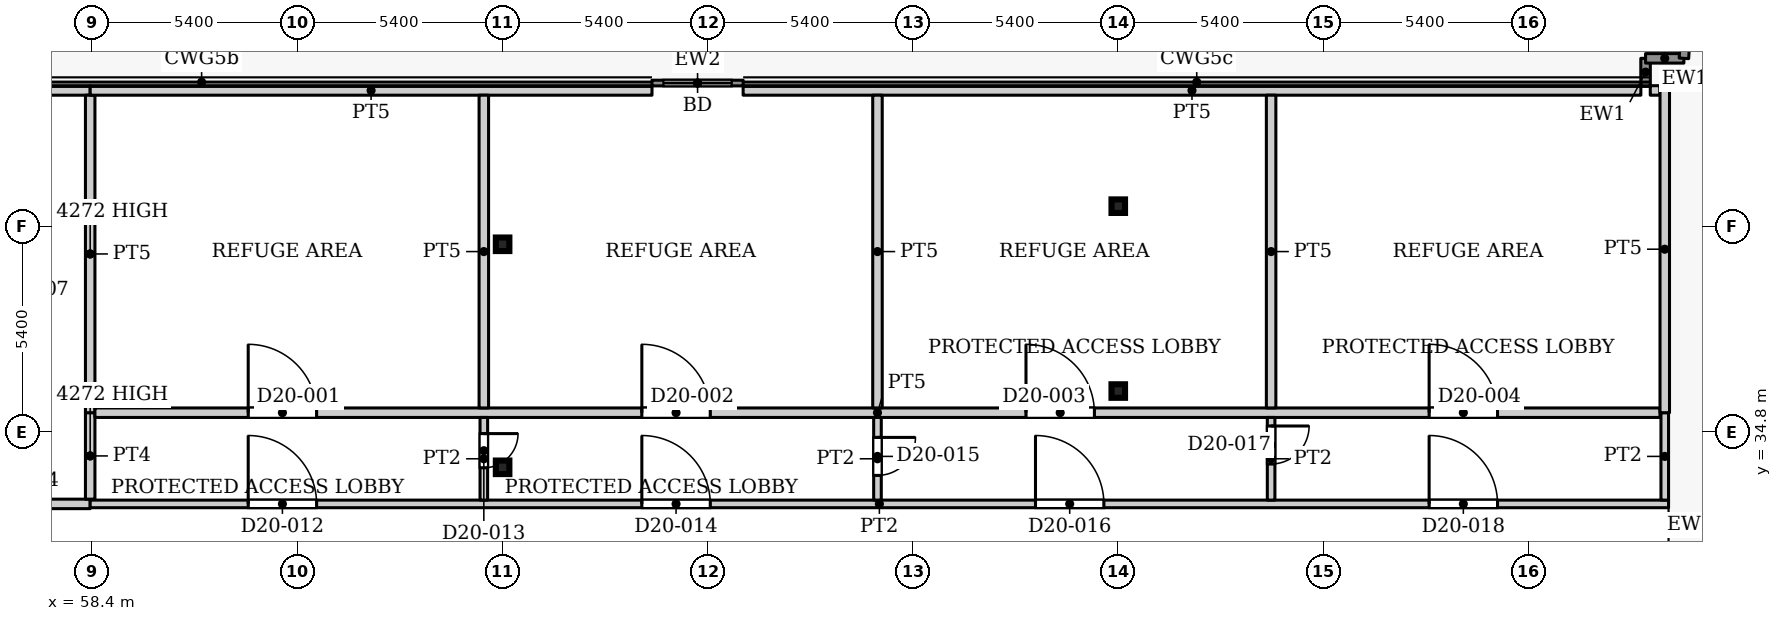
"""IFC4 building model, lengths in metres.
Left out: names, types, materials, properties, quantities, classifications, styles, units other than length and angle.
Written with IfcOpenShell. Run it as: python <this file> out.ifc"""

import sys

from ifc_helpers import new_model, si_unit, direction, frame, frame_2d, origin, origin_2d, place, context, subcontext, project, spatial, rectangle, hollow_rectangle, extrude, source, transform, mapped, element, fill, save


model = new_model("IFC4")
c1 = context("Model", 3, precision=1e-05, world=origin(), true_north=direction((0.0, 1.0)))
c2 = subcontext(c1, "Body", "Model", "MODEL_VIEW")
j1 = project(units=[si_unit("LENGTHUNIT", "METRE"), si_unit("PLANEANGLEUNIT", "RADIAN")], contexts=[c1])
p1 = place(None, origin())
s1 = spatial("IfcSite", under=j1, at=p1, CompositionType="ELEMENT")
p2 = place(p1, origin())
s2 = spatial("IfcBuilding", under=s1, at=p2, CompositionType="ELEMENT")
p3 = place(p2, frame((0.0, 0.0, 89.0)))
s3 = spatial("IfcBuildingStorey", under=s2, at=p3, CompositionType="ELEMENT", Elevation=89.0)
for number, where, z_axis, x_axis in (
    (1, (69.2, 33.863, 0.0), (0.0, 0.0, 1.0), (1.0, 0.0, 0.0)),
    (2, (85.4, 35.87, 0.0), (0.0, 0.0, 1.0), (1.0, 0.0, 0.0)),
    (3, (69.2, 39.732, 0.0), (0.0, 0.0, 1.0), (1.0, 0.0, 0.0)),
    (4, (85.4, 40.735, 0.0), (0.0, 0.0, 1.0), (1.0, 0.0, 0.0)),
):
    element("IfcColumn", number, at=place(p3, frame(where, z_axis=z_axis, x_axis=x_axis)), inside=s3, PredefinedType="COLUMN", context=c2, shape_type="SweptSolid", body=[
        extrude(hollow_rectangle(XDim=0.356, YDim=0.356, WallThickness=0.016, InnerFilletRadius=0.016, OuterFilletRadius=0.032, at=origin_2d()), origin(), (0.0, 0.0, 1.0), 5.1),
    ])
p4 = place(p3, frame((73.13, 43.975, 0.0), z_axis=(0.0, 0.0, 1.0), x_axis=(1.0, 0.0, 0.0)))
e5 = element("IfcWall", 5, at=p4, inside=s3, PredefinedType="SOLIDWALL", context=c2, shape_type="SweptSolid", body=[
    extrude(rectangle(XDim=2.4, YDim=0.15, at=frame_2d((1.2, 0.0))), origin(), (0.0, 0.0, 1.0), 4.95),
])
p5 = place(p4, frame((0.3, 0.0, 0.0)))
e6 = element("IfcOpeningElement", 6, at=p5, cuts=e5, PredefinedType="OPENING", context=c2, shape_type="SweptSolid", body=[
    extrude(rectangle(XDim=1.8, YDim=2.4, at=frame_2d((0.9, 1.2))), frame((0.0, 0.085, 0.0), z_axis=(0.0, -1.0, 0.0), x_axis=(1.0, 0.0, 0.0)), (0.0, 0.0, 1.0), 0.17),
])
p6 = place(p3, frame((99.275, 43.9, 0.0), z_axis=(0.0, 0.0, 1.0), x_axis=(0.0, 1.0, 0.0)))
e7 = element("IfcWall", 7, at=p6, inside=s3, PredefinedType="SOLIDWALL", context=c2, shape_type="SweptSolid", body=[
    extrude(rectangle(XDim=0.725, YDim=0.25, at=frame_2d((0.363, 0.0))), origin(), (0.0, 0.0, 1.0), 4.95),
])
p7 = place(p3, frame((99.275, 44.625, 0.0), z_axis=(0.0, 0.0, 1.0), x_axis=(1.0, 0.0, 0.0)))
e8 = element("IfcWall", 8, at=p7, inside=s3, PredefinedType="SOLIDWALL", context=c2, shape_type="SweptSolid", body=[
    extrude(rectangle(XDim=1.009, YDim=0.25, at=frame_2d((0.504, 0.0))), origin(), (0.0, 0.0, 1.0), 4.95),
])
p8 = place(p3, frame((100.284, 44.625, 0.0), z_axis=(0.0, 0.0, 1.0), x_axis=(0.064063773599, 0.997945806601, 0.0)))
e9 = element("IfcWall", 9, at=p8, inside=s3, PredefinedType="SOLIDWALL", context=c2, shape_type="SweptSolid", body=[
    extrude(rectangle(XDim=0.64, YDim=0.25, at=frame_2d((0.32, 0.0))), origin(), (0.0, 0.0, 1.0), 4.95),
])
p9 = place(p3, frame((49.611, 43.78, 0.0), z_axis=(0.0, 0.0, 1.0), x_axis=(1.0, 0.0, 0.0)))
e10 = element("IfcWall", 10, at=p9, inside=s3, PredefinedType="PARTITIONING", context=c2, shape_type="SweptSolid", body=[
    extrude(rectangle(XDim=8.737, YDim=0.25, at=frame_2d((4.368, 0.0))), origin(), (0.0, 0.0, 1.0), 4.8),
])
p10 = place(p3, frame((55.675, 32.9, 0.0), z_axis=(0.0, 0.0, 1.0), x_axis=(1.0, 0.0, 0.0)))
e11 = element("IfcWall", 11, at=p10, inside=s3, PredefinedType="PARTITIONING", context=c2, shape_type="SweptSolid", body=[
    extrude(rectangle(XDim=2.673, YDim=0.25, at=frame_2d((1.336, 0.0))), origin(), (0.0, 0.0, 1.0), 4.8),
])
p11 = place(p3, frame((58.348, 32.9, 0.0), z_axis=(0.0, 0.0, 1.0), x_axis=(1.0, 0.0, 0.0)))
e12 = element("IfcWall", 12, at=p11, inside=s3, PredefinedType="PARTITIONING", context=c2, shape_type="SweptSolid", body=[
    extrude(rectangle(XDim=41.532, YDim=0.2, at=frame_2d((20.766, 0.0))), origin(), (0.0, 0.0, 1.0), 4.8),
])
p12 = place(p11, frame((4.158, 0.0, 0.0)))
e13 = element("IfcOpeningElement", 13, at=p12, cuts=e12, PredefinedType="OPENING", context=c2, shape_type="SweptSolid", body=[
    extrude(rectangle(XDim=1.8, YDim=2.1, at=frame_2d((0.9, 1.05))), frame((0.0, 0.11, 0.0), z_axis=(0.0, -1.0, 0.0), x_axis=(1.0, 0.0, 0.0)), (0.0, 0.0, 1.0), 0.22),
])
p13 = place(p11, frame((14.516, 0.0, 0.0)))
e14 = element("IfcOpeningElement", 14, at=p13, cuts=e12, PredefinedType="OPENING", context=c2, shape_type="SweptSolid", body=[
    extrude(rectangle(XDim=1.8, YDim=2.1, at=frame_2d((0.9, 1.05))), frame((0.0, 0.11, 0.0), z_axis=(0.0, -1.0, 0.0), x_axis=(1.0, 0.0, 0.0)), (0.0, 0.0, 1.0), 0.22),
])
p14 = place(p11, frame((24.874, 0.0, 0.0)))
e15 = element("IfcOpeningElement", 15, at=p14, cuts=e12, PredefinedType="OPENING", context=c2, shape_type="SweptSolid", body=[
    extrude(rectangle(XDim=1.8, YDim=2.1, at=frame_2d((0.9, 1.05))), frame((0.0, 0.11, 0.0), z_axis=(0.0, -1.0, 0.0), x_axis=(1.0, 0.0, 0.0)), (0.0, 0.0, 1.0), 0.22),
])
p15 = place(p11, frame((35.232, 0.0, 0.0)))
e16 = element("IfcOpeningElement", 16, at=p15, cuts=e12, PredefinedType="OPENING", context=c2, shape_type="SweptSolid", body=[
    extrude(rectangle(XDim=1.8, YDim=2.1, at=frame_2d((0.9, 1.05))), frame((0.0, 0.11, 0.0), z_axis=(0.0, -1.0, 0.0), x_axis=(1.0, 0.0, 0.0)), (0.0, 0.0, 1.0), 0.22),
])
p16 = place(p3, frame((58.348, 33.025, 0.0), z_axis=(0.0, 0.0, 1.0), x_axis=(0.0, 1.0, 0.0)))
e17 = element("IfcWall", 17, at=p16, inside=s3, PredefinedType="PARTITIONING", context=c2, shape_type="SweptSolid", body=[
    extrude(rectangle(XDim=2.275, YDim=0.25, at=frame_2d((1.138, 0.0))), origin(), (0.0, 0.0, 1.0), 4.272),
])
p17 = place(p3, frame((58.348, 35.3, 0.0), z_axis=(0.0, 0.0, 1.0), x_axis=(0.0, 1.0, 0.0)))
e18 = element("IfcWall", 18, at=p17, inside=s3, PredefinedType="PARTITIONING", context=c2, shape_type="SweptSolid", body=[
    extrude(rectangle(XDim=8.355, YDim=0.25, at=frame_2d((4.177, 0.0))), origin(), (0.0, 0.0, 1.0), 4.272),
])
p18 = place(p3, frame((58.348, 43.78, 0.0), z_axis=(0.0, 0.0, 1.0), x_axis=(1.0, 0.0, 0.0)))
e19 = element("IfcWall", 19, at=p18, inside=s3, PredefinedType="PARTITIONING", context=c2, shape_type="SweptSolid", body=[
    extrude(rectangle(XDim=14.783, YDim=0.25, at=frame_2d((7.392, 0.0))), origin(), (0.0, 0.0, 1.0), 4.8),
])
p19 = place(p3, frame((58.473, 35.3, 0.0), z_axis=(0.0, 0.0, 1.0), x_axis=(1.0, 0.0, 0.0)))
e20 = element("IfcWall", 20, at=p19, inside=s3, PredefinedType="PARTITIONING", context=c2, shape_type="SweptSolid", body=[
    extrude(rectangle(XDim=41.182, YDim=0.25, at=frame_2d((20.591, 0.0))), origin(), (0.0, 0.0, 1.0), 4.8),
])
p20 = place(p19, frame((4.033, 0.0, 0.0)))
e21 = element("IfcOpeningElement", 21, at=p20, cuts=e20, PredefinedType="OPENING", context=c2, shape_type="SweptSolid", body=[
    extrude(rectangle(XDim=1.8, YDim=2.1, at=frame_2d((0.9, 1.05))), frame((0.0, 0.135, 0.0), z_axis=(0.0, -1.0, 0.0), x_axis=(1.0, 0.0, 0.0)), (0.0, 0.0, 1.0), 0.27),
])
p21 = place(p19, frame((14.391, 0.0, 0.0)))
e22 = element("IfcOpeningElement", 22, at=p21, cuts=e20, PredefinedType="OPENING", context=c2, shape_type="SweptSolid", body=[
    extrude(rectangle(XDim=1.8, YDim=2.1, at=frame_2d((0.9, 1.05))), frame((0.0, 0.135, 0.0), z_axis=(0.0, -1.0, 0.0), x_axis=(1.0, 0.0, 0.0)), (0.0, 0.0, 1.0), 0.27),
])
p22 = place(p19, frame((24.499, 0.0, 0.0)))
e23 = element("IfcOpeningElement", 23, at=p22, cuts=e20, PredefinedType="OPENING", context=c2, shape_type="SweptSolid", body=[
    extrude(rectangle(XDim=1.8, YDim=2.1, at=frame_2d((0.9, 1.05))), frame((0.0, 0.135, 0.0), z_axis=(0.0, -1.0, 0.0), x_axis=(1.0, 0.0, 0.0)), (0.0, 0.0, 1.0), 0.27),
])
p23 = place(p19, frame((35.107, 0.0, 0.0)))
e24 = element("IfcOpeningElement", 24, at=p23, cuts=e20, PredefinedType="OPENING", context=c2, shape_type="SweptSolid", body=[
    extrude(rectangle(XDim=1.8, YDim=2.1, at=frame_2d((0.9, 1.05))), frame((0.0, 0.135, 0.0), z_axis=(0.0, -1.0, 0.0), x_axis=(1.0, 0.0, 0.0)), (0.0, 0.0, 1.0), 0.27),
])
p24 = place(p3, frame((68.706, 33.0, 0.0), z_axis=(0.0, 0.0, 1.0), x_axis=(0.0, 1.0, 0.0)))
e25 = element("IfcWall", 25, at=p24, inside=s3, PredefinedType="PARTITIONING", context=c2, shape_type="SweptSolid", body=[
    extrude(rectangle(XDim=2.175, YDim=0.2, at=frame_2d((1.087, 0.0))), origin(), (0.0, 0.0, 1.0), 4.8),
])
p25 = place(p24, frame((0.85, 0.0, 0.0)))
e26 = element("IfcOpeningElement", 26, at=p25, cuts=e25, PredefinedType="OPENING", context=c2, shape_type="SweptSolid", body=[
    extrude(rectangle(XDim=0.9, YDim=2.1, at=frame_2d((0.45, 1.05))), frame((0.0, 0.11, 0.0), z_axis=(0.0, -1.0, 0.0), x_axis=(1.0, 0.0, 0.0)), (0.0, 0.0, 1.0), 0.22),
])
p26 = place(p3, frame((68.706, 35.425, 0.0), z_axis=(0.0, 0.0, 1.0), x_axis=(0.0, 1.0, 0.0)))
e27 = element("IfcWall", 27, at=p26, inside=s3, PredefinedType="PARTITIONING", context=c2, shape_type="SweptSolid", body=[
    extrude(rectangle(XDim=8.23, YDim=0.25, at=frame_2d((4.115, 0.0))), origin(), (0.0, 0.0, 1.0), 4.8),
])
p27 = place(p3, frame((75.529, 43.78, 0.0), z_axis=(0.0, 0.0, 1.0), x_axis=(1.0, 0.0, 0.0)))
e28 = element("IfcWall", 28, at=p27, inside=s3, PredefinedType="PARTITIONING", context=c2, shape_type="SweptSolid", body=[
    extrude(rectangle(XDim=23.622, YDim=0.25, at=frame_2d((11.811, 0.0))), origin(), (0.0, 0.0, 1.0), 4.8),
])
p28 = place(p3, frame((79.064, 33.0, 0.0), z_axis=(0.0, 0.0, 1.0), x_axis=(0.0, 1.0, 0.0)))
e29 = element("IfcWall", 29, at=p28, inside=s3, PredefinedType="PARTITIONING", context=c2, shape_type="SweptSolid", body=[
    extrude(rectangle(XDim=2.175, YDim=0.2, at=frame_2d((1.087, 0.0))), origin(), (0.0, 0.0, 1.0), 4.8),
])
p29 = place(p28, frame((0.65, 0.0, 0.0)))
e30 = element("IfcOpeningElement", 30, at=p29, cuts=e29, PredefinedType="OPENING", context=c2, shape_type="SweptSolid", body=[
    extrude(rectangle(XDim=1.0, YDim=2.1, at=frame_2d((0.5, 1.05))), frame((0.0, 0.11, 0.0), z_axis=(0.0, -1.0, 0.0), x_axis=(1.0, 0.0, 0.0)), (0.0, 0.0, 1.0), 0.22),
])
p30 = place(p3, frame((79.064, 35.425, 0.0), z_axis=(0.0, 0.0, 1.0), x_axis=(0.0, 1.0, 0.0)))
e31 = element("IfcWall", 31, at=p30, inside=s3, PredefinedType="PARTITIONING", context=c2, shape_type="SweptSolid", body=[
    extrude(rectangle(XDim=8.23, YDim=0.25, at=frame_2d((4.115, 0.0))), origin(), (0.0, 0.0, 1.0), 4.8),
])
p31 = place(p3, frame((89.422, 33.0, 0.0), z_axis=(0.0, 0.0, 1.0), x_axis=(0.0, 1.0, 0.0)))
e32 = element("IfcWall", 32, at=p31, inside=s3, PredefinedType="PARTITIONING", context=c2, shape_type="SweptSolid", body=[
    extrude(rectangle(XDim=2.175, YDim=0.2, at=frame_2d((1.087, 0.0))), origin(), (0.0, 0.0, 1.0), 4.8),
])
p32 = place(p31, frame((0.95, 0.0, 0.0)))
e33 = element("IfcOpeningElement", 33, at=p32, cuts=e32, PredefinedType="OPENING", context=c2, shape_type="SweptSolid", body=[
    extrude(rectangle(XDim=1.0, YDim=2.1, at=frame_2d((0.5, 1.05))), frame((0.0, 0.11, 0.0), z_axis=(0.0, -1.0, 0.0), x_axis=(1.0, 0.0, 0.0)), (0.0, 0.0, 1.0), 0.22),
])
p33 = place(p3, frame((89.422, 35.425, 0.0), z_axis=(0.0, 0.0, 1.0), x_axis=(0.0, 1.0, 0.0)))
e34 = element("IfcWall", 34, at=p33, inside=s3, PredefinedType="PARTITIONING", context=c2, shape_type="SweptSolid", body=[
    extrude(rectangle(XDim=8.23, YDim=0.25, at=frame_2d((4.115, 0.0))), origin(), (0.0, 0.0, 1.0), 4.8),
])
p34 = place(p3, frame((99.399, 43.78, 0.0), z_axis=(0.0, 0.0, 1.0), x_axis=(1.0, 0.0, 0.0)))
e35 = element("IfcWall", 35, at=p34, inside=s3, PredefinedType="PARTITIONING", context=c2, shape_type="SweptSolid", body=[
    extrude(rectangle(XDim=0.256, YDim=0.25, at=frame_2d((0.128, 0.0))), origin(), (0.0, 0.0, 1.0), 4.8),
])
p35 = place(p3, frame((99.78, 33.0, 0.0), z_axis=(0.0, 0.0, 1.0), x_axis=(0.0, 1.0, 0.0)))
e36 = element("IfcWall", 36, at=p35, inside=s3, PredefinedType="PARTITIONING", context=c2, shape_type="SweptSolid", body=[
    extrude(rectangle(XDim=2.3, YDim=0.2, at=frame_2d((1.15, 0.0))), origin(), (0.0, 0.0, 1.0), 4.8),
])
p36 = place(p3, frame((99.78, 35.3, 0.0), z_axis=(0.0, 0.0, 1.0), x_axis=(0.0, 1.0, 0.0)))
e37 = element("IfcWall", 37, at=p36, inside=s3, PredefinedType="PARTITIONING", context=c2, shape_type="SweptSolid", body=[
    extrude(rectangle(XDim=8.605, YDim=0.25, at=frame_2d((4.302, 0.0))), origin(), (0.0, 0.0, 1.0), 4.8),
])
m1 = source(origin(), c2, "Body", "SweptSolid", [
    extrude(rectangle(XDim=1.8, YDim=2.4, at=frame_2d((0.9, 1.2))), frame((0.0, 0.025, 0.0), z_axis=(0.0, -1.0, 0.0), x_axis=(1.0, 0.0, 0.0)), (0.0, 0.0, 1.0), 0.05),
])
p37 = place(p5, origin())
e38 = element("IfcDoor", 38, at=p37, inside=s3, OperationType="SLIDING_TO_LEFT", PredefinedType="DOOR", context=c2, shape_type="MappedRepresentation", body=[
    mapped(m1, transform((0.0, 0.0, 0.0), x_axis=(1.0, 0.0, 0.0), y_axis=(0.0, 1.0, 0.0), z_axis=(0.0, 0.0, 1.0), scale=1.0)),
])
fill(e6, e38)
m2 = source(origin(), c2, "Body", "SweptSolid", [
    extrude(rectangle(XDim=1.8, YDim=2.1, at=frame_2d((0.9, 1.05))), frame((0.0, 0.025, 0.0), z_axis=(0.0, -1.0, 0.0), x_axis=(1.0, 0.0, 0.0)), (0.0, 0.0, 1.0), 0.05),
])
p38 = place(p20, origin())
e39 = element("IfcDoor", 39, at=p38, inside=s3, OperationType="DOUBLE_DOOR_SINGLE_SWING", PredefinedType="DOOR", context=c2, shape_type="MappedRepresentation", body=[
    mapped(m2, transform((0.0, 0.0, 0.0), x_axis=(1.0, 0.0, 0.0), y_axis=(0.0, 1.0, 0.0), z_axis=(0.0, 0.0, 1.0), scale=1.0)),
])
fill(e21, e39)
p39 = place(p21, origin())
e40 = element("IfcDoor", 40, at=p39, inside=s3, OperationType="DOUBLE_DOOR_SINGLE_SWING", PredefinedType="DOOR", context=c2, shape_type="MappedRepresentation", body=[
    mapped(m2, transform((0.0, 0.0, 0.0), x_axis=(1.0, 0.0, 0.0), y_axis=(0.0, 1.0, 0.0), z_axis=(0.0, 0.0, 1.0), scale=1.0)),
])
fill(e22, e40)
p40 = place(p22, origin())
e41 = element("IfcDoor", 41, at=p40, inside=s3, OperationType="DOUBLE_DOOR_SINGLE_SWING", PredefinedType="DOOR", context=c2, shape_type="MappedRepresentation", body=[
    mapped(m2, transform((0.0, 0.0, 0.0), x_axis=(1.0, 0.0, 0.0), y_axis=(0.0, 1.0, 0.0), z_axis=(0.0, 0.0, 1.0), scale=1.0)),
])
fill(e23, e41)
p41 = place(p23, origin())
e42 = element("IfcDoor", 42, at=p41, inside=s3, OperationType="DOUBLE_DOOR_SINGLE_SWING", PredefinedType="DOOR", context=c2, shape_type="MappedRepresentation", body=[
    mapped(m2, transform((0.0, 0.0, 0.0), x_axis=(1.0, 0.0, 0.0), y_axis=(0.0, 1.0, 0.0), z_axis=(0.0, 0.0, 1.0), scale=1.0)),
])
fill(e24, e42)
m3 = source(origin(), c2, "Body", "SweptSolid", [
    extrude(rectangle(XDim=1.8, YDim=2.1, at=frame_2d((0.9, 1.05))), frame((0.0, 0.025, 0.0), z_axis=(0.0, -1.0, 0.0), x_axis=(1.0, 0.0, 0.0)), (0.0, 0.0, 1.0), 0.05),
])
p42 = place(p12, origin())
e43 = element("IfcDoor", 43, at=p42, inside=s3, OperationType="DOUBLE_DOOR_SINGLE_SWING", PredefinedType="DOOR", context=c2, shape_type="MappedRepresentation", body=[
    mapped(m3, transform((0.0, 0.0, 0.0), x_axis=(1.0, 0.0, 0.0), y_axis=(0.0, 1.0, 0.0), z_axis=(0.0, 0.0, 1.0), scale=1.0)),
])
fill(e13, e43)
m4 = source(origin(), c2, "Body", "SweptSolid", [
    extrude(rectangle(XDim=0.9, YDim=2.1, at=frame_2d((0.45, 1.05))), frame((0.0, 0.025, 0.0), z_axis=(0.0, -1.0, 0.0), x_axis=(1.0, 0.0, 0.0)), (0.0, 0.0, 1.0), 0.05),
])
p43 = place(p25, origin())
e44 = element("IfcDoor", 44, at=p43, inside=s3, OperationType="SINGLE_SWING_RIGHT", PredefinedType="DOOR", context=c2, shape_type="MappedRepresentation", body=[
    mapped(m4, transform((0.0, 0.0, 0.0), x_axis=(1.0, 0.0, 0.0), y_axis=(0.0, 1.0, 0.0), z_axis=(0.0, 0.0, 1.0), scale=1.0)),
])
fill(e26, e44)
p44 = place(p13, origin())
e45 = element("IfcDoor", 45, at=p44, inside=s3, OperationType="DOUBLE_DOOR_SINGLE_SWING", PredefinedType="DOOR", context=c2, shape_type="MappedRepresentation", body=[
    mapped(m3, transform((0.0, 0.0, 0.0), x_axis=(1.0, 0.0, 0.0), y_axis=(0.0, 1.0, 0.0), z_axis=(0.0, 0.0, 1.0), scale=1.0)),
])
fill(e14, e45)
m5 = source(origin(), c2, "Body", "SweptSolid", [
    extrude(rectangle(XDim=1.0, YDim=2.1, at=frame_2d((0.5, 1.05))), frame((0.0, 0.025, 0.0), z_axis=(0.0, -1.0, 0.0), x_axis=(1.0, 0.0, 0.0)), (0.0, 0.0, 1.0), 0.05),
])
p45 = place(p29, origin())
e46 = element("IfcDoor", 46, at=p45, inside=s3, OperationType="SINGLE_SWING_RIGHT", PredefinedType="DOOR", context=c2, shape_type="MappedRepresentation", body=[
    mapped(m5, transform((0.0, 0.0, 0.0), x_axis=(1.0, 0.0, 0.0), y_axis=(0.0, 1.0, 0.0), z_axis=(0.0, 0.0, 1.0), scale=1.0)),
])
fill(e30, e46)
p46 = place(p14, origin())
e47 = element("IfcDoor", 47, at=p46, inside=s3, OperationType="DOUBLE_DOOR_SINGLE_SWING", PredefinedType="DOOR", context=c2, shape_type="MappedRepresentation", body=[
    mapped(m3, transform((0.0, 0.0, 0.0), x_axis=(1.0, 0.0, 0.0), y_axis=(0.0, 1.0, 0.0), z_axis=(0.0, 0.0, 1.0), scale=1.0)),
])
fill(e15, e47)
p47 = place(p32, origin())
e48 = element("IfcDoor", 48, at=p47, inside=s3, OperationType="SINGLE_SWING_RIGHT", PredefinedType="DOOR", context=c2, shape_type="MappedRepresentation", body=[
    mapped(m5, transform((0.0, 0.0, 0.0), x_axis=(1.0, 0.0, 0.0), y_axis=(0.0, 1.0, 0.0), z_axis=(0.0, 0.0, 1.0), scale=1.0)),
])
fill(e33, e48)
p48 = place(p15, origin())
e49 = element("IfcDoor", 49, at=p48, inside=s3, OperationType="DOUBLE_DOOR_SINGLE_SWING", PredefinedType="DOOR", context=c2, shape_type="MappedRepresentation", body=[
    mapped(m3, transform((0.0, 0.0, 0.0), x_axis=(1.0, 0.0, 0.0), y_axis=(0.0, 1.0, 0.0), z_axis=(0.0, 0.0, 1.0), scale=1.0)),
])
fill(e16, e49)
save(model, sys.argv[1])
